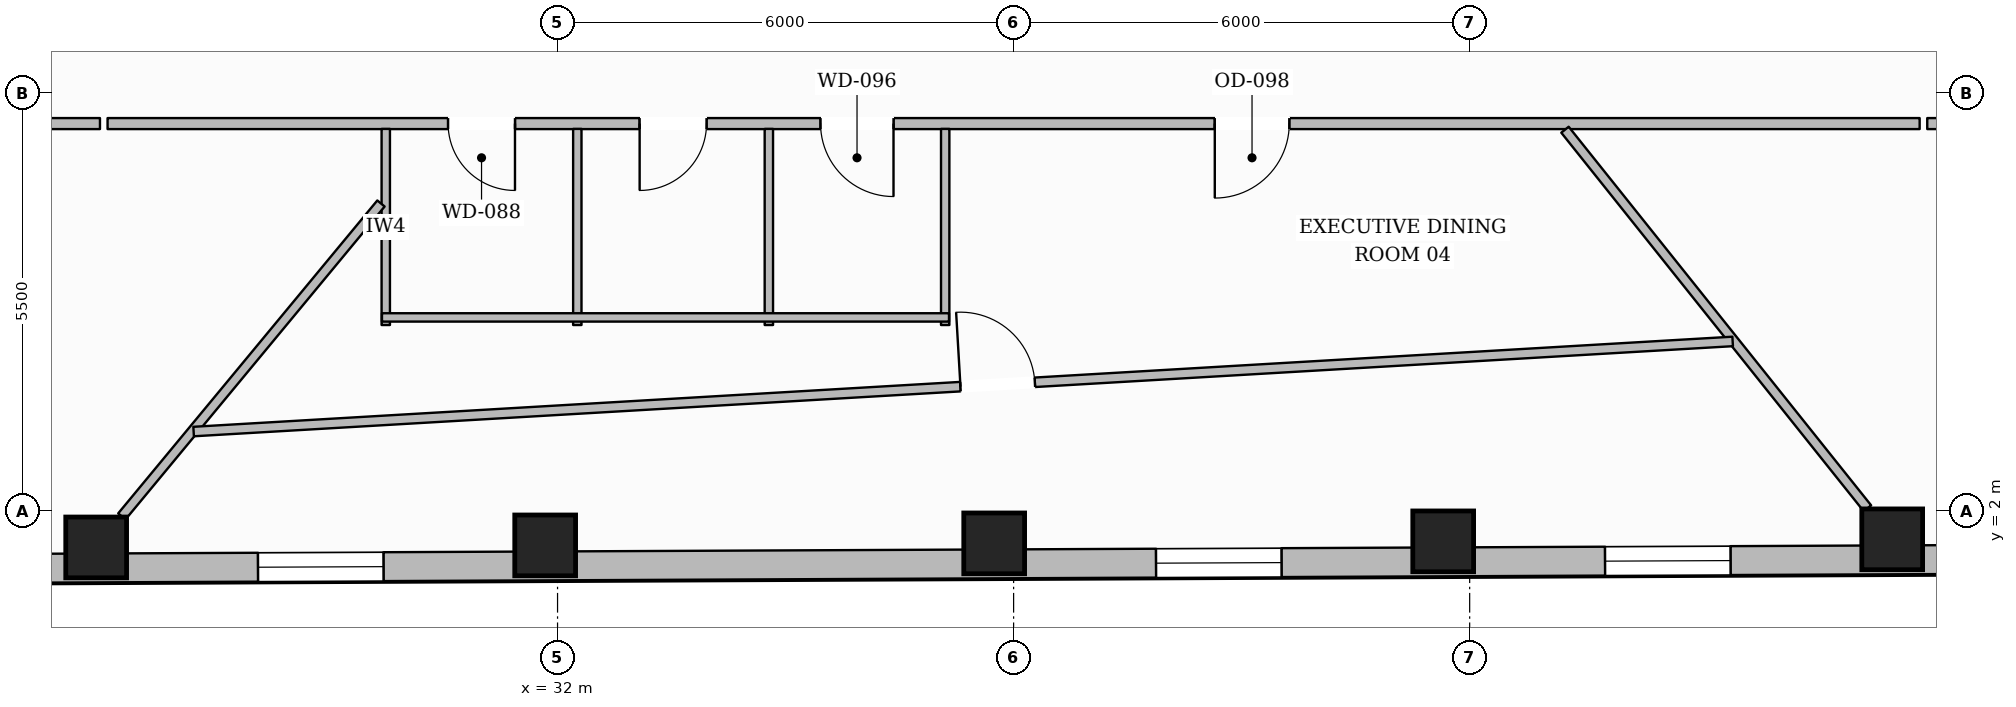
"""IFC4 building model, lengths in metres.
Left out: names, types, materials, properties, quantities, classifications, styles, units other than length and angle.
Written with IfcOpenShell. Run it as: python <this file> out.ifc"""

import sys

from ifc_helpers import new_model, si_unit, direction, frame, frame_2d, origin, origin_2d, place, context, subcontext, project, spatial, rectangle, hollow_rectangle, extrude, element, fill, save


model = new_model("IFC4")
c1 = context("Model", 3, precision=1e-05, world=origin(), true_north=direction((0.0, 1.0)))
c2 = subcontext(c1, "Body", "Model", "MODEL_VIEW")
j1 = project(units=[si_unit("LENGTHUNIT", "METRE"), si_unit("PLANEANGLEUNIT", "RADIAN")], contexts=[c1])
p1 = place(None, origin())
s1 = spatial("IfcSite", under=j1, at=p1, CompositionType="ELEMENT")
p2 = place(p1, origin())
s2 = spatial("IfcBuilding", under=s1, at=p2, CompositionType="ELEMENT")
p3 = place(p2, frame((0.0, 0.0, 67.6)))
s3 = spatial("IfcBuildingStorey", under=s2, at=p3, CompositionType="ELEMENT", Elevation=67.6)
for number, where, z_axis, x_axis in (
    (1, (25.93, 1.524, 0.0), (0.0, 0.0, 1.0), (1.0, 0.0, 0.0)),
    (2, (31.837, 1.551, 0.0), (0.0, 0.0, 1.0), (1.0, 0.0, 0.0)),
    (3, (37.744, 1.577, 0.0), (0.0, 0.0, 1.0), (1.0, 0.0, 0.0)),
    (4, (43.652, 1.604, 0.0), (0.0, 0.0, 1.0), (1.0, 0.0, 0.0)),
    (5, (49.559, 1.631, 0.0), (0.0, 0.0, 1.0), (1.0, 0.0, 0.0)),
):
    element("IfcColumn", number, at=place(p3, frame(where, z_axis=z_axis, x_axis=x_axis)), inside=s3, PredefinedType="COLUMN", context=c2, shape_type="SweptSolid", body=[
        extrude(hollow_rectangle(XDim=0.8, YDim=0.8, WallThickness=0.036, at=origin_2d()), origin(), (0.0, 0.0, 1.0), 3.59),
    ])
p4 = place(p3, frame((55.941, 1.389, 0.0), z_axis=(0.0, 0.0, 1.0), x_axis=(-0.999989840169, -0.004507722052, 0.0)))
e6 = element("IfcWall", 6, at=p4, inside=s3, PredefinedType="STANDARD", context=c2, shape_type="SweptSolid", body=[
    extrude(rectangle(XDim=36.396, YDim=0.38, at=frame_2d((18.198, 0.0))), origin(), (0.0, 0.0, 1.0), 2.97),
])
p5 = place(p4, frame((32.139, 0.0, 0.65)))
e7 = element("IfcOpeningElement", 7, at=p5, cuts=e6, PredefinedType="OPENING", context=c2, shape_type="SweptSolid", body=[
    extrude(rectangle(XDim=1.65, YDim=1.75, at=frame_2d((0.825, 0.875))), frame((0.0, 0.2, 0.0), z_axis=(0.0, -1.0, 0.0), x_axis=(1.0, 0.0, 0.0)), (0.0, 0.0, 1.0), 0.4),
])
p6 = place(p4, frame((26.232, 0.0, 0.65)))
e8 = element("IfcOpeningElement", 8, at=p6, cuts=e6, PredefinedType="OPENING", context=c2, shape_type="SweptSolid", body=[
    extrude(rectangle(XDim=1.65, YDim=1.75, at=frame_2d((0.825, 0.875))), frame((0.0, 0.2, 0.0), z_axis=(0.0, -1.0, 0.0), x_axis=(1.0, 0.0, 0.0)), (0.0, 0.0, 1.0), 0.4),
])
p7 = place(p4, frame((14.417, 0.0, 0.65)))
e9 = element("IfcOpeningElement", 9, at=p7, cuts=e6, PredefinedType="OPENING", context=c2, shape_type="SweptSolid", body=[
    extrude(rectangle(XDim=1.65, YDim=1.75, at=frame_2d((0.825, 0.875))), frame((0.0, 0.2, 0.0), z_axis=(0.0, -1.0, 0.0), x_axis=(1.0, 0.0, 0.0)), (0.0, 0.0, 1.0), 0.4),
])
p8 = place(p4, frame((8.51, 0.0, 0.65)))
e10 = element("IfcOpeningElement", 10, at=p8, cuts=e6, PredefinedType="OPENING", context=c2, shape_type="SweptSolid", body=[
    extrude(rectangle(XDim=1.65, YDim=1.75, at=frame_2d((0.825, 0.875))), frame((0.0, 0.2, 0.0), z_axis=(0.0, -1.0, 0.0), x_axis=(1.0, 0.0, 0.0)), (0.0, 0.0, 1.0), 0.4),
])
p9 = place(p4, frame((2.603, 0.0, 0.65)))
e11 = element("IfcOpeningElement", 11, at=p9, cuts=e6, PredefinedType="OPENING", context=c2, shape_type="SweptSolid", body=[
    extrude(rectangle(XDim=1.65, YDim=1.75, at=frame_2d((0.825, 0.875))), frame((0.0, 0.2, 0.0), z_axis=(0.0, -1.0, 0.0), x_axis=(1.0, 0.0, 0.0)), (0.0, 0.0, 1.0), 0.4),
])
p10 = place(p3, frame((56.592, 7.1, 0.0), z_axis=(0.0, 0.0, 1.0), x_axis=(-1.0, 0.0, 0.0)))
e12 = element("IfcWall", 12, at=p10, inside=s3, PredefinedType="PARTITIONING", context=c2, shape_type="SweptSolid", body=[
    extrude(rectangle(XDim=6.572, YDim=0.145, at=frame_2d((3.286, 0.0))), origin(), (0.0, 0.0, 1.0), 3.59),
])
p11 = place(p3, frame((49.92, 7.1, 0.0), z_axis=(0.0, 0.0, 1.0), x_axis=(-1.0, 0.0, 0.0)))
e13 = element("IfcWall", 13, at=p11, inside=s3, PredefinedType="PARTITIONING", context=c2, shape_type="SweptSolid", body=[
    extrude(rectangle(XDim=23.84, YDim=0.145, at=frame_2d((11.92, 0.0))), origin(), (0.0, 0.0, 1.0), 3.278),
])
p12 = place(p11, frame((18.48, 0.0, 0.0)))
e14 = element("IfcOpeningElement", 14, at=p12, cuts=e13, PredefinedType="OPENING", context=c2, shape_type="SweptSolid", body=[
    extrude(rectangle(XDim=0.88, YDim=2.1, at=frame_2d((0.44, 1.05))), frame((0.0, 0.083, 0.0), z_axis=(0.0, -1.0, 0.0), x_axis=(1.0, 0.0, 0.0)), (0.0, 0.0, 1.0), 0.165),
])
p13 = place(p11, frame((15.96, 0.0, 0.0)))
e15 = element("IfcOpeningElement", 15, at=p13, cuts=e13, PredefinedType="OPENING", context=c2, shape_type="SweptSolid", body=[
    extrude(rectangle(XDim=0.88, YDim=2.1, at=frame_2d((0.44, 1.05))), frame((0.0, 0.083, 0.0), z_axis=(0.0, -1.0, 0.0), x_axis=(1.0, 0.0, 0.0)), (0.0, 0.0, 1.0), 0.165),
])
p14 = place(p11, frame((13.5, 0.0, 0.0)))
e16 = element("IfcOpeningElement", 16, at=p14, cuts=e13, PredefinedType="OPENING", context=c2, shape_type="SweptSolid", body=[
    extrude(rectangle(XDim=0.96, YDim=2.1, at=frame_2d((0.48, 1.05))), frame((0.0, 0.083, 0.0), z_axis=(0.0, -1.0, 0.0), x_axis=(1.0, 0.0, 0.0)), (0.0, 0.0, 1.0), 0.165),
])
p15 = place(p11, frame((8.293, 0.0, 0.0)))
e17 = element("IfcOpeningElement", 17, at=p15, cuts=e13, PredefinedType="OPENING", context=c2, shape_type="SweptSolid", body=[
    extrude(rectangle(XDim=0.98, YDim=2.15, at=frame_2d((0.49, 1.075))), frame((0.0, 0.083, 0.0), z_axis=(0.0, -1.0, 0.0), x_axis=(1.0, 0.0, 0.0)), (0.0, 0.0, 1.0), 0.165),
])
p16 = place(p3, frame((25.98, 7.1, 0.0), z_axis=(0.0, 0.0, 1.0), x_axis=(-1.0, 0.0, 0.0)))
e18 = element("IfcWall", 18, at=p16, inside=s3, PredefinedType="PARTITIONING", context=c2, shape_type="SweptSolid", body=[
    extrude(rectangle(XDim=7.139, YDim=0.145, at=frame_2d((3.569, 0.0))), origin(), (0.0, 0.0, 1.0), 3.59),
])
for number, where, z_axis, x_axis in (
    (19, (29.74, 4.45, 0.0), (0.0, 0.0, 1.0), (0.0, 1.0, 0.0)),
    (20, (32.26, 4.45, 0.0), (0.0, 0.0, 1.0), (0.0, 1.0, 0.0)),
    (21, (34.78, 4.45, 0.0), (0.0, 0.0, 1.0), (0.0, 1.0, 0.0)),
    (22, (37.1, 4.45, 0.0), (0.0, 0.0, 1.0), (0.0, 1.0, 0.0)),
):
    element("IfcWall", number, at=place(p3, frame(where, z_axis=z_axis, x_axis=x_axis)), inside=s3, PredefinedType="PLUMBINGWALL", context=c2, shape_type="SweptSolid", body=[
        extrude(rectangle(XDim=2.58, YDim=0.11, at=frame_2d((1.29, 0.0))), origin(), (0.0, 0.0, 1.0), 3.59),
    ])
p17 = place(p3, frame((29.69, 4.55, 0.0), z_axis=(0.0, 0.0, 1.0), x_axis=(1.0, 0.0, 0.0)))
e23 = element("IfcWall", 23, at=p17, inside=s3, PredefinedType="PLUMBINGWALL", context=c2, shape_type="SweptSolid", body=[
    extrude(rectangle(XDim=7.46, YDim=0.11, at=frame_2d((3.73, 0.0))), origin(), (0.0, 0.0, 1.0), 3.59),
])
p18 = place(p3, frame((29.677, 6.049, 0.0), z_axis=(0.0, 0.0, 1.0), x_axis=(-0.637795767438, -0.770205530386, 0.0)))
e24 = element("IfcWall", 24, at=p18, inside=s3, PredefinedType="PARTITIONING", context=c2, shape_type="SweptSolid", body=[
    extrude(rectangle(XDim=5.345, YDim=0.125, at=frame_2d((2.673, 0.0))), origin(), (0.0, 0.0, 1.0), 3.59),
])
p19 = place(p3, frame((45.254, 7.02, 0.0), z_axis=(0.0, 0.0, 1.0), x_axis=(0.624167183672, -0.781290808103, 0.0)))
e25 = element("IfcWall", 25, at=p19, inside=s3, PredefinedType="PARTITIONING", context=c2, shape_type="SweptSolid", body=[
    extrude(rectangle(XDim=6.375, YDim=0.125, at=frame_2d((3.188, 0.0))), origin(), (0.0, 0.0, 1.0), 3.59),
])
p20 = place(p3, frame((27.212, 3.049, 0.0), z_axis=(0.0, 0.0, 1.0), x_axis=(0.998290936072, 0.058439772046, 0.0)))
e26 = element("IfcWall", 26, at=p20, inside=s3, PredefinedType="PARTITIONING", context=c2, shape_type="SweptSolid", body=[
    extrude(rectangle(XDim=20.282, YDim=0.125, at=frame_2d((10.141, 0.0))), origin(), (0.0, 0.0, 1.0), 3.278),
])
p21 = place(p20, frame((10.106, 0.0, 0.0)))
e27 = element("IfcOpeningElement", 27, at=p21, cuts=e26, PredefinedType="OPENING", context=c2, shape_type="SweptSolid", body=[
    extrude(rectangle(XDim=0.98, YDim=2.15, at=frame_2d((0.49, 1.075))), frame((0.0, 0.073, 0.0), z_axis=(0.0, -1.0, 0.0), x_axis=(1.0, 0.0, 0.0)), (0.0, 0.0, 1.0), 0.145),
])
p22 = place(p6, origin())
e28 = element("IfcWindow", 28, at=p22, inside=s3, PartitioningType="SINGLE_PANEL", PredefinedType="WINDOW", context=c2, shape_type="SweptSolid", body=[
    extrude(rectangle(XDim=1.65, YDim=1.75, at=frame_2d((0.825, 0.875))), frame((0.0, 0.03, 0.0), z_axis=(0.0, -1.0, 0.0), x_axis=(1.0, 0.0, 0.0)), (0.0, 0.0, 1.0), 0.06),
])
fill(e8, e28)
p23 = place(p7, origin())
e29 = element("IfcWindow", 29, at=p23, inside=s3, PartitioningType="SINGLE_PANEL", PredefinedType="WINDOW", context=c2, shape_type="SweptSolid", body=[
    extrude(rectangle(XDim=1.65, YDim=1.75, at=frame_2d((0.825, 0.875))), frame((0.0, 0.03, 0.0), z_axis=(0.0, -1.0, 0.0), x_axis=(1.0, 0.0, 0.0)), (0.0, 0.0, 1.0), 0.06),
])
fill(e9, e29)
p24 = place(p8, origin())
e30 = element("IfcWindow", 30, at=p24, inside=s3, PartitioningType="SINGLE_PANEL", PredefinedType="WINDOW", context=c2, shape_type="SweptSolid", body=[
    extrude(rectangle(XDim=1.65, YDim=1.75, at=frame_2d((0.825, 0.875))), frame((0.0, 0.03, 0.0), z_axis=(0.0, -1.0, 0.0), x_axis=(1.0, 0.0, 0.0)), (0.0, 0.0, 1.0), 0.06),
])
fill(e10, e30)
p25 = place(p12, origin())
e31 = element("IfcDoor", 31, at=p25, inside=s3, OperationType="SINGLE_SWING_LEFT", PredefinedType="DOOR", context=c2, shape_type="SweptSolid", body=[
    extrude(rectangle(XDim=0.88, YDim=2.1, at=frame_2d((0.44, 1.05))), frame((0.0, 0.025, 0.0), z_axis=(0.0, -1.0, 0.0), x_axis=(1.0, 0.0, 0.0)), (0.0, 0.0, 1.0), 0.05),
])
fill(e14, e31)
p26 = place(p13, origin())
e32 = element("IfcDoor", 32, at=p26, inside=s3, OperationType="SINGLE_SWING_RIGHT", PredefinedType="DOOR", context=c2, shape_type="SweptSolid", body=[
    extrude(rectangle(XDim=0.88, YDim=2.1, at=frame_2d((0.44, 1.05))), frame((0.0, 0.025, 0.0), z_axis=(0.0, -1.0, 0.0), x_axis=(1.0, 0.0, 0.0)), (0.0, 0.0, 1.0), 0.05),
])
fill(e15, e32)
p27 = place(p14, origin())
e33 = element("IfcDoor", 33, at=p27, inside=s3, OperationType="SINGLE_SWING_LEFT", PredefinedType="DOOR", context=c2, shape_type="SweptSolid", body=[
    extrude(rectangle(XDim=0.96, YDim=2.1, at=frame_2d((0.48, 1.05))), frame((0.0, 0.025, 0.0), z_axis=(0.0, -1.0, 0.0), x_axis=(1.0, 0.0, 0.0)), (0.0, 0.0, 1.0), 0.05),
])
fill(e16, e33)
p28 = place(p15, origin())
e34 = element("IfcDoor", 34, at=p28, inside=s3, OperationType="SINGLE_SWING_RIGHT", PredefinedType="DOOR", context=c2, shape_type="SweptSolid", body=[
    extrude(rectangle(XDim=0.98, YDim=2.15, at=frame_2d((0.49, 1.075))), frame((0.0, 0.025, 0.0), z_axis=(0.0, -1.0, 0.0), x_axis=(1.0, 0.0, 0.0)), (0.0, 0.0, 1.0), 0.05),
])
fill(e17, e34)
p29 = place(p21, origin())
e35 = element("IfcDoor", 35, at=p29, inside=s3, OperationType="SINGLE_SWING_LEFT", PredefinedType="DOOR", context=c2, shape_type="SweptSolid", body=[
    extrude(rectangle(XDim=0.98, YDim=2.15, at=frame_2d((0.49, 1.075))), frame((0.0, 0.025, 0.0), z_axis=(0.0, -1.0, 0.0), x_axis=(1.0, 0.0, 0.0)), (0.0, 0.0, 1.0), 0.05),
])
fill(e27, e35)
save(model, sys.argv[1])
